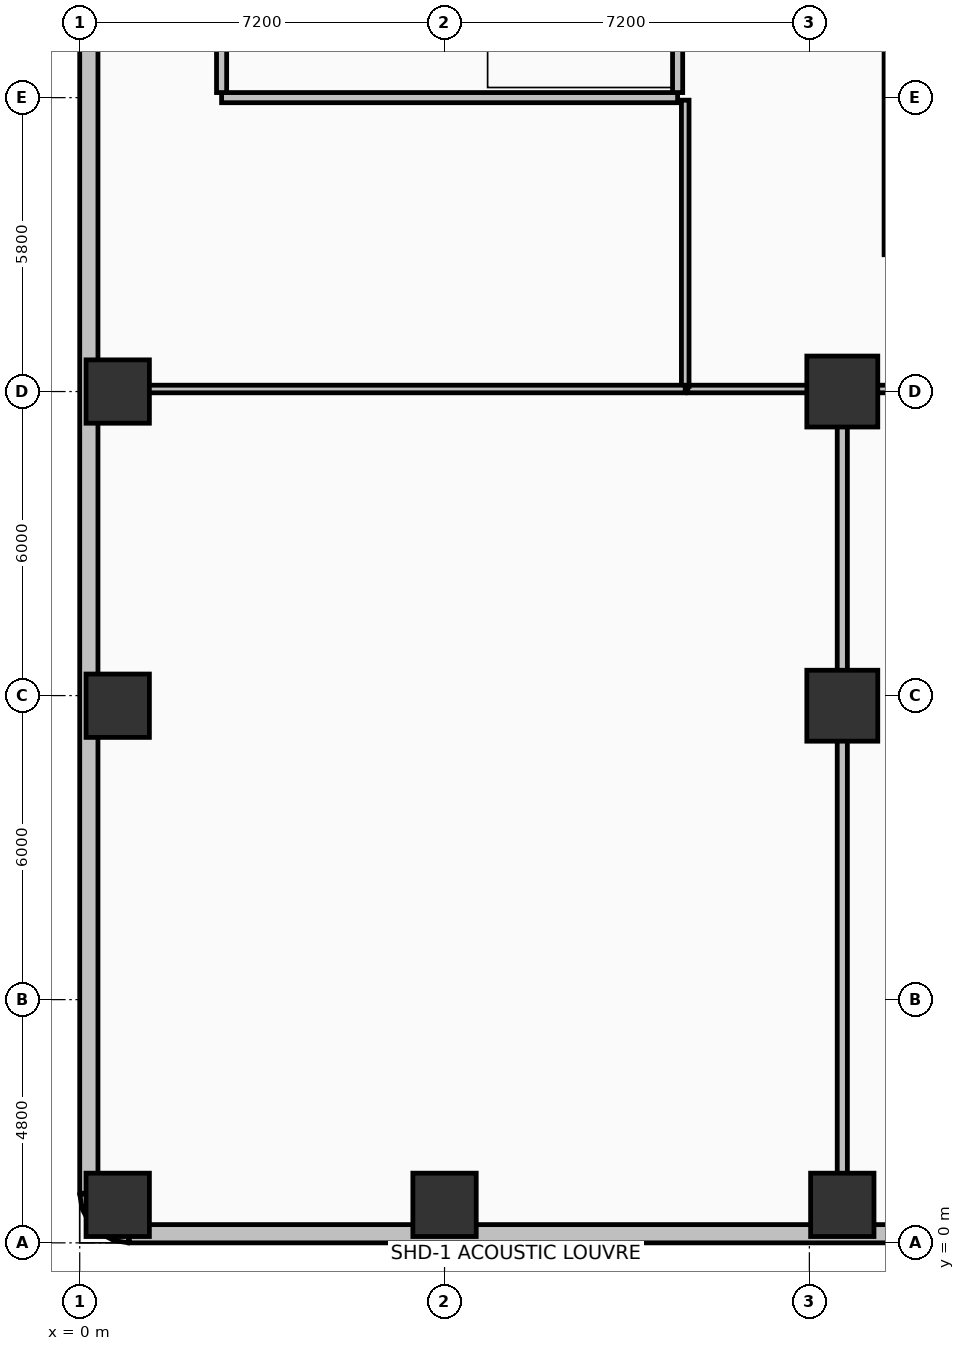
"""IFC4 building model, lengths in metres.
Left out: names, types, materials, properties, quantities, classifications, styles, units other than length and angle.
Written with IfcOpenShell. Run it as: python <this file> out.ifc"""

import sys

from ifc_helpers import new_model, si_unit, direction, frame, frame_2d, origin, origin_2d, place, context, subcontext, project, spatial, rectangle, extrude, element, fill, save


model = new_model("IFC4")
c1 = context("Model", 3, precision=1e-05, world=origin(), true_north=direction((0.0, 1.0)))
c2 = subcontext(c1, "Body", "Model", "MODEL_VIEW")
j1 = project(units=[si_unit("LENGTHUNIT", "METRE"), si_unit("PLANEANGLEUNIT", "RADIAN")], contexts=[c1])
p1 = place(None, origin())
s1 = spatial("IfcSite", under=j1, at=p1, CompositionType="ELEMENT")
p2 = place(p1, origin())
s2 = spatial("IfcBuilding", under=s1, at=p2, CompositionType="ELEMENT")
p3 = place(p2, frame((0.0, 0.0, 11.1)))
s3 = spatial("IfcBuildingStorey", under=s2, at=p3, CompositionType="ELEMENT", Elevation=11.1)
for number, where, z_axis, x_axis in (
    (1, (0.75, 0.75, 0.0), (0.0, 0.0, 1.0), (1.0, 0.0, 0.0)),
    (2, (0.75, 10.6, 0.0), (0.0, 0.0, 1.0), (1.0, 0.0, 0.0)),
    (3, (0.75, 16.8, 0.0), (0.0, 0.0, 1.0), (1.0, 0.0, 0.0)),
    (4, (7.2, 0.75, 0.0), (0.0, 0.0, 1.0), (1.0, 0.0, 0.0)),
    (5, (15.05, 0.75, 0.0), (0.0, 0.0, 1.0), (1.0, 0.0, 0.0)),
):
    element("IfcColumn", number, at=place(p3, frame(where, z_axis=z_axis, x_axis=x_axis)), inside=s3, PredefinedType="COLUMN", context=c2, shape_type="SweptSolid", body=[
        extrude(rectangle(XDim=1.25, YDim=1.25, at=origin_2d()), origin(), (0.0, 0.0, 1.0), 4.5),
    ])
for number, where, z_axis, x_axis in (
    (6, (15.05, 10.6, 0.0), (0.0, 0.0, 1.0), (1.0, 0.0, 0.0)),
    (7, (15.05, 16.8, 0.0), (0.0, 0.0, 1.0), (1.0, 0.0, 0.0)),
):
    element("IfcColumn", number, at=place(p3, frame(where, z_axis=z_axis, x_axis=x_axis)), inside=s3, PredefinedType="COLUMN", context=c2, shape_type="SweptSolid", body=[
        extrude(rectangle(XDim=1.4, YDim=1.4, at=origin_2d()), origin(), (0.0, 0.0, 1.0), 4.5),
    ])
for number, where, z_axis, x_axis in (
    (8, (0.18, 0.98, 0.0), (0.0, 0.0, 1.0), (0.157, -0.988, 0.0)),
    (9, (0.219, 0.733, 0.0), (0.0, 0.0, 1.0), (0.453, -0.891, 0.0)),
    (10, (0.333, 0.51, 0.0), (0.0, 0.0, 1.0), (0.707, -0.707, 0.0)),
    (11, (0.51, 0.333, 0.0), (0.0, 0.0, 1.0), (0.891, -0.453, 0.0)),
    (12, (0.733, 0.219, 0.0), (0.0, 0.0, 1.0), (0.988, -0.157, 0.0)),
):
    element("IfcWall", number, at=place(p3, frame(where, z_axis=z_axis, x_axis=x_axis)), inside=s3, PredefinedType="SOLIDWALL", context=c2, shape_type="SweptSolid", body=[
        extrude(rectangle(XDim=0.25, YDim=0.36, at=frame_2d((0.125, 0.0))), origin(), (0.0, 0.0, 1.0), 3.48),
    ])
p4 = place(p3, frame((0.98, 0.18, 0.0), z_axis=(0.0, 0.0, 1.0), x_axis=(1.0, 0.0, 0.0)))
e13 = element("IfcWall", 13, at=p4, inside=s3, PredefinedType="SOLIDWALL", context=c2, shape_type="SweptSolid", body=[
    extrude(rectangle(XDim=15.25, YDim=0.36, at=frame_2d((7.625, 0.0))), origin(), (0.0, 0.0, 1.0), 3.48),
])
p5 = place(p4, frame((1.494, 0.0, 0.9)))
e14 = element("IfcOpeningElement", 14, at=p5, cuts=e13, PredefinedType="OPENING", context=c2, shape_type="SweptSolid", body=[
    extrude(rectangle(XDim=1.8, YDim=2.1, at=frame_2d((0.9, 1.05))), frame((0.0, 0.19, 0.0), z_axis=(0.0, -1.0, 0.0), x_axis=(1.0, 0.0, 0.0)), (0.0, 0.0, 1.0), 0.38),
])
p6 = place(p4, frame((8.469, 0.0, 0.9)))
e15 = element("IfcOpeningElement", 15, at=p6, cuts=e13, PredefinedType="OPENING", context=c2, shape_type="SweptSolid", body=[
    extrude(rectangle(XDim=1.8, YDim=2.1, at=frame_2d((0.9, 1.05))), frame((0.0, 0.19, 0.0), z_axis=(0.0, -1.0, 0.0), x_axis=(1.0, 0.0, 0.0)), (0.0, 0.0, 1.0), 0.38),
])
p7 = place(p4, frame((10.906, 0.0, 0.9)))
e16 = element("IfcOpeningElement", 16, at=p7, cuts=e13, PredefinedType="OPENING", context=c2, shape_type="SweptSolid", body=[
    extrude(rectangle(XDim=1.8, YDim=2.1, at=frame_2d((0.9, 1.05))), frame((0.0, 0.19, 0.0), z_axis=(0.0, -1.0, 0.0), x_axis=(1.0, 0.0, 0.0)), (0.0, 0.0, 1.0), 0.38),
])
p8 = place(p3, frame((0.18, 55.42, 0.0), z_axis=(0.0, 0.0, 1.0), x_axis=(0.0, -1.0, 0.0)))
e17 = element("IfcWall", 17, at=p8, inside=s3, PredefinedType="SOLIDWALL", context=c2, shape_type="SweptSolid", body=[
    extrude(rectangle(XDim=54.44, YDim=0.36, at=frame_2d((27.22, 0.0))), origin(), (0.0, 0.0, 1.0), 3.48),
])
p9 = place(p8, frame((1.411, 0.0, 0.9)))
e18 = element("IfcOpeningElement", 18, at=p9, cuts=e17, PredefinedType="OPENING", context=c2, shape_type="SweptSolid", body=[
    extrude(rectangle(XDim=1.8, YDim=2.1, at=frame_2d((0.9, 1.05))), frame((0.0, 0.19, 0.0), z_axis=(0.0, -1.0, 0.0), x_axis=(1.0, 0.0, 0.0)), (0.0, 0.0, 1.0), 0.38),
])
p10 = place(p8, frame((4.732, 0.0, 0.9)))
e19 = element("IfcOpeningElement", 19, at=p10, cuts=e17, PredefinedType="OPENING", context=c2, shape_type="SweptSolid", body=[
    extrude(rectangle(XDim=1.8, YDim=2.1, at=frame_2d((0.9, 1.05))), frame((0.0, 0.19, 0.0), z_axis=(0.0, -1.0, 0.0), x_axis=(1.0, 0.0, 0.0)), (0.0, 0.0, 1.0), 0.38),
])
p11 = place(p8, frame((11.375, 0.0, 0.9)))
e20 = element("IfcOpeningElement", 20, at=p11, cuts=e17, PredefinedType="OPENING", context=c2, shape_type="SweptSolid", body=[
    extrude(rectangle(XDim=1.8, YDim=2.1, at=frame_2d((0.9, 1.05))), frame((0.0, 0.19, 0.0), z_axis=(0.0, -1.0, 0.0), x_axis=(1.0, 0.0, 0.0)), (0.0, 0.0, 1.0), 0.38),
])
p12 = place(p8, frame((18.017, 0.0, 0.9)))
e21 = element("IfcOpeningElement", 21, at=p12, cuts=e17, PredefinedType="OPENING", context=c2, shape_type="SweptSolid", body=[
    extrude(rectangle(XDim=1.8, YDim=2.1, at=frame_2d((0.9, 1.05))), frame((0.0, 0.19, 0.0), z_axis=(0.0, -1.0, 0.0), x_axis=(1.0, 0.0, 0.0)), (0.0, 0.0, 1.0), 0.38),
])
p13 = place(p8, frame((21.338, 0.0, 0.9)))
e22 = element("IfcOpeningElement", 22, at=p13, cuts=e17, PredefinedType="OPENING", context=c2, shape_type="SweptSolid", body=[
    extrude(rectangle(XDim=1.8, YDim=2.1, at=frame_2d((0.9, 1.05))), frame((0.0, 0.19, 0.0), z_axis=(0.0, -1.0, 0.0), x_axis=(1.0, 0.0, 0.0)), (0.0, 0.0, 1.0), 0.38),
])
p14 = place(p8, frame((23.959, 0.0, 0.9)))
e23 = element("IfcOpeningElement", 23, at=p14, cuts=e17, PredefinedType="OPENING", context=c2, shape_type="SweptSolid", body=[
    extrude(rectangle(XDim=1.8, YDim=2.1, at=frame_2d((0.9, 1.05))), frame((0.0, 0.19, 0.0), z_axis=(0.0, -1.0, 0.0), x_axis=(1.0, 0.0, 0.0)), (0.0, 0.0, 1.0), 0.38),
])
p15 = place(p8, frame((28.681, 0.0, 0.9)))
e24 = element("IfcOpeningElement", 24, at=p15, cuts=e17, PredefinedType="OPENING", context=c2, shape_type="SweptSolid", body=[
    extrude(rectangle(XDim=1.8, YDim=2.1, at=frame_2d((0.9, 1.05))), frame((0.0, 0.19, 0.0), z_axis=(0.0, -1.0, 0.0), x_axis=(1.0, 0.0, 0.0)), (0.0, 0.0, 1.0), 0.38),
])
p16 = place(p8, frame((31.302, 0.0, 0.9)))
e25 = element("IfcOpeningElement", 25, at=p16, cuts=e17, PredefinedType="OPENING", context=c2, shape_type="SweptSolid", body=[
    extrude(rectangle(XDim=1.8, YDim=2.1, at=frame_2d((0.9, 1.05))), frame((0.0, 0.19, 0.0), z_axis=(0.0, -1.0, 0.0), x_axis=(1.0, 0.0, 0.0)), (0.0, 0.0, 1.0), 0.38),
])
p17 = place(p8, frame((34.623, 0.0, 0.9)))
e26 = element("IfcOpeningElement", 26, at=p17, cuts=e17, PredefinedType="OPENING", context=c2, shape_type="SweptSolid", body=[
    extrude(rectangle(XDim=1.8, YDim=2.1, at=frame_2d((0.9, 1.05))), frame((0.0, 0.19, 0.0), z_axis=(0.0, -1.0, 0.0), x_axis=(1.0, 0.0, 0.0)), (0.0, 0.0, 1.0), 0.38),
])
p18 = place(p8, frame((41.266, 0.0, 0.9)))
e27 = element("IfcOpeningElement", 27, at=p18, cuts=e17, PredefinedType="OPENING", context=c2, shape_type="SweptSolid", body=[
    extrude(rectangle(XDim=1.8, YDim=2.1, at=frame_2d((0.9, 1.05))), frame((0.0, 0.19, 0.0), z_axis=(0.0, -1.0, 0.0), x_axis=(1.0, 0.0, 0.0)), (0.0, 0.0, 1.0), 0.38),
])
p19 = place(p8, frame((47.908, 0.0, 0.9)))
e28 = element("IfcOpeningElement", 28, at=p19, cuts=e17, PredefinedType="OPENING", context=c2, shape_type="SweptSolid", body=[
    extrude(rectangle(XDim=1.8, YDim=2.1, at=frame_2d((0.9, 1.05))), frame((0.0, 0.19, 0.0), z_axis=(0.0, -1.0, 0.0), x_axis=(1.0, 0.0, 0.0)), (0.0, 0.0, 1.0), 0.38),
])
p20 = place(p8, frame((51.229, 0.0, 0.9)))
e29 = element("IfcOpeningElement", 29, at=p20, cuts=e17, PredefinedType="OPENING", context=c2, shape_type="SweptSolid", body=[
    extrude(rectangle(XDim=1.8, YDim=2.1, at=frame_2d((0.9, 1.05))), frame((0.0, 0.19, 0.0), z_axis=(0.0, -1.0, 0.0), x_axis=(1.0, 0.0, 0.0)), (0.0, 0.0, 1.0), 0.38),
])
p21 = place(p3, frame((2.8, 22.6, 0.0), z_axis=(0.0, 0.0, 1.0), x_axis=(1.0, 0.0, 0.0)))
e30 = element("IfcWall", 30, at=p21, inside=s3, PredefinedType="SHEAR", context=c2, shape_type="SweptSolid", body=[
    extrude(rectangle(XDim=9.0, YDim=0.2, at=frame_2d((4.5, 0.0))), origin(), (0.0, 0.0, 1.0), 4.5),
])
for number, where, z_axis, x_axis in (
    (31, (2.8, 22.7, 0.0), (0.0, 0.0, 1.0), (0.0, 1.0, 0.0)),
    (32, (11.8, 22.7, 0.0), (0.0, 0.0, 1.0), (0.0, 1.0, 0.0)),
):
    element("IfcWall", number, at=place(p3, frame(where, z_axis=z_axis, x_axis=x_axis)), inside=s3, PredefinedType="SHEAR", context=c2, shape_type="SweptSolid", body=[
        extrude(rectangle(XDim=3.4, YDim=0.2, at=frame_2d((1.7, 0.0))), origin(), (0.0, 0.0, 1.0), 4.5),
    ])
p22 = place(p3, frame((15.95, 19.5, 0.0), z_axis=(0.0, 0.0, 1.0), x_axis=(0.0, 1.0, 0.0)))
e33 = element("IfcWall", 33, at=p22, inside=s3, PredefinedType="PARTITIONING", context=c2, shape_type="SweptSolid", body=[
    extrude(rectangle(XDim=17.4, YDim=0.15, at=frame_2d((8.7, 0.0))), origin(), (0.0, 0.0, 1.0), 3.42),
])
p23 = place(p3, frame((15.05, 0.4, 0.0), z_axis=(0.0, 0.0, 1.0), x_axis=(0.0, 1.0, 0.0)))
e34 = element("IfcWall", 34, at=p23, inside=s3, PredefinedType="PARTITIONING", context=c2, shape_type="SweptSolid", body=[
    extrude(rectangle(XDim=16.4, YDim=0.2, at=frame_2d((8.2, 0.0))), origin(), (0.0, 0.0, 1.0), 3.42),
])
p24 = place(p23, frame((5.5, 0.0, 0.0)))
e35 = element("IfcOpeningElement", 35, at=p24, cuts=e34, PredefinedType="OPENING", context=c2, shape_type="SweptSolid", body=[
    extrude(rectangle(XDim=1.0, YDim=2.15, at=frame_2d((0.5, 1.075))), frame((0.0, 0.11, 0.0), z_axis=(0.0, -1.0, 0.0), x_axis=(1.0, 0.0, 0.0)), (0.0, 0.0, 1.0), 0.22),
])
p25 = place(p3, frame((12.0, 16.85, 0.0), z_axis=(0.0, 0.0, 1.0), x_axis=(1.0, 0.0, 0.0)))
e36 = element("IfcWall", 36, at=p25, inside=s3, PredefinedType="PARTITIONING", context=c2, shape_type="SweptSolid", body=[
    extrude(rectangle(XDim=13.25, YDim=0.15, at=frame_2d((6.625, 0.0))), origin(), (0.0, 0.0, 1.0), 3.42),
])
p26 = place(p25, frame((7.5, 0.0, 0.0)))
e37 = element("IfcOpeningElement", 37, at=p26, cuts=e36, PredefinedType="OPENING", context=c2, shape_type="SweptSolid", body=[
    extrude(rectangle(XDim=1.0, YDim=2.15, at=frame_2d((0.5, 1.075))), frame((0.0, 0.085, 0.0), z_axis=(0.0, -1.0, 0.0), x_axis=(1.0, 0.0, 0.0)), (0.0, 0.0, 1.0), 0.17),
])
p27 = place(p3, frame((11.95, 16.9, 0.0), z_axis=(0.0, 0.0, 1.0), x_axis=(0.0, 1.0, 0.0)))
e38 = element("IfcWall", 38, at=p27, inside=s3, PredefinedType="PARTITIONING", context=c2, shape_type="SweptSolid", body=[
    extrude(rectangle(XDim=5.65, YDim=0.15, at=frame_2d((2.825, 0.0))), origin(), (0.0, 0.0, 1.0), 3.42),
])
p28 = place(p27, frame((2.1, 0.0, 0.0)))
e39 = element("IfcOpeningElement", 39, at=p28, cuts=e38, PredefinedType="OPENING", context=c2, shape_type="SweptSolid", body=[
    extrude(rectangle(XDim=0.95, YDim=2.1, at=frame_2d((0.475, 1.05))), frame((0.0, 0.085, 0.0), z_axis=(0.0, -1.0, 0.0), x_axis=(1.0, 0.0, 0.0)), (0.0, 0.0, 1.0), 0.17),
])
p29 = place(p3, frame((0.4, 16.85, 0.0), z_axis=(0.0, 0.0, 1.0), x_axis=(1.0, 0.0, 0.0)))
e40 = element("IfcWall", 40, at=p29, inside=s3, PredefinedType="PARTITIONING", context=c2, shape_type="SweptSolid", body=[
    extrude(rectangle(XDim=11.55, YDim=0.15, at=frame_2d((5.775, 0.0))), origin(), (0.0, 0.0, 1.0), 3.42),
])
p30 = place(p5, origin())
e41 = element("IfcWindow", 41, at=p30, inside=s3, PartitioningType="SINGLE_PANEL", PredefinedType="WINDOW", context=c2, shape_type="SweptSolid", body=[
    extrude(rectangle(XDim=1.8, YDim=2.1, at=frame_2d((0.9, 1.05))), frame((0.0, 0.03, 0.0), z_axis=(0.0, -1.0, 0.0), x_axis=(1.0, 0.0, 0.0)), (0.0, 0.0, 1.0), 0.06),
])
fill(e14, e41)
p31 = place(p6, origin())
e42 = element("IfcWindow", 42, at=p31, inside=s3, PartitioningType="SINGLE_PANEL", PredefinedType="WINDOW", context=c2, shape_type="SweptSolid", body=[
    extrude(rectangle(XDim=1.8, YDim=2.1, at=frame_2d((0.9, 1.05))), frame((0.0, 0.03, 0.0), z_axis=(0.0, -1.0, 0.0), x_axis=(1.0, 0.0, 0.0)), (0.0, 0.0, 1.0), 0.06),
])
fill(e15, e42)
p32 = place(p7, origin())
e43 = element("IfcWindow", 43, at=p32, inside=s3, PartitioningType="SINGLE_PANEL", PredefinedType="WINDOW", context=c2, shape_type="SweptSolid", body=[
    extrude(rectangle(XDim=1.8, YDim=2.1, at=frame_2d((0.9, 1.05))), frame((0.0, 0.03, 0.0), z_axis=(0.0, -1.0, 0.0), x_axis=(1.0, 0.0, 0.0)), (0.0, 0.0, 1.0), 0.06),
])
fill(e16, e43)
p33 = place(p16, origin())
e44 = element("IfcWindow", 44, at=p33, inside=s3, PartitioningType="SINGLE_PANEL", PredefinedType="WINDOW", context=c2, shape_type="SweptSolid", body=[
    extrude(rectangle(XDim=1.8, YDim=2.1, at=frame_2d((0.9, 1.05))), frame((0.0, 0.03, 0.0), z_axis=(0.0, -1.0, 0.0), x_axis=(1.0, 0.0, 0.0)), (0.0, 0.0, 1.0), 0.06),
])
fill(e25, e44)
p34 = place(p17, origin())
e45 = element("IfcWindow", 45, at=p34, inside=s3, PartitioningType="SINGLE_PANEL", PredefinedType="WINDOW", context=c2, shape_type="SweptSolid", body=[
    extrude(rectangle(XDim=1.8, YDim=2.1, at=frame_2d((0.9, 1.05))), frame((0.0, 0.03, 0.0), z_axis=(0.0, -1.0, 0.0), x_axis=(1.0, 0.0, 0.0)), (0.0, 0.0, 1.0), 0.06),
])
fill(e26, e45)
p35 = place(p18, origin())
e46 = element("IfcWindow", 46, at=p35, inside=s3, PartitioningType="SINGLE_PANEL", PredefinedType="WINDOW", context=c2, shape_type="SweptSolid", body=[
    extrude(rectangle(XDim=1.8, YDim=2.1, at=frame_2d((0.9, 1.05))), frame((0.0, 0.03, 0.0), z_axis=(0.0, -1.0, 0.0), x_axis=(1.0, 0.0, 0.0)), (0.0, 0.0, 1.0), 0.06),
])
fill(e27, e46)
p36 = place(p19, origin())
e47 = element("IfcWindow", 47, at=p36, inside=s3, PartitioningType="SINGLE_PANEL", PredefinedType="WINDOW", context=c2, shape_type="SweptSolid", body=[
    extrude(rectangle(XDim=1.8, YDim=2.1, at=frame_2d((0.9, 1.05))), frame((0.0, 0.03, 0.0), z_axis=(0.0, -1.0, 0.0), x_axis=(1.0, 0.0, 0.0)), (0.0, 0.0, 1.0), 0.06),
])
fill(e28, e47)
p37 = place(p20, origin())
e48 = element("IfcWindow", 48, at=p37, inside=s3, PartitioningType="SINGLE_PANEL", PredefinedType="WINDOW", context=c2, shape_type="SweptSolid", body=[
    extrude(rectangle(XDim=1.8, YDim=2.1, at=frame_2d((0.9, 1.05))), frame((0.0, 0.03, 0.0), z_axis=(0.0, -1.0, 0.0), x_axis=(1.0, 0.0, 0.0)), (0.0, 0.0, 1.0), 0.06),
])
fill(e29, e48)
p38 = place(p24, origin())
e49 = element("IfcDoor", 49, at=p38, inside=s3, OperationType="SINGLE_SWING_LEFT", PredefinedType="DOOR", context=c2, shape_type="SweptSolid", body=[
    extrude(rectangle(XDim=1.0, YDim=2.15, at=frame_2d((0.5, 1.075))), frame((0.0, 0.025, 0.0), z_axis=(0.0, -1.0, 0.0), x_axis=(1.0, 0.0, 0.0)), (0.0, 0.0, 1.0), 0.05),
])
fill(e35, e49)
p39 = place(p28, origin())
e50 = element("IfcDoor", 50, at=p39, inside=s3, OperationType="SINGLE_SWING_LEFT", PredefinedType="DOOR", context=c2, shape_type="SweptSolid", body=[
    extrude(rectangle(XDim=0.95, YDim=2.1, at=frame_2d((0.475, 1.05))), frame((0.0, 0.025, 0.0), z_axis=(0.0, -1.0, 0.0), x_axis=(1.0, 0.0, 0.0)), (0.0, 0.0, 1.0), 0.05),
])
fill(e39, e50)
save(model, sys.argv[1])
